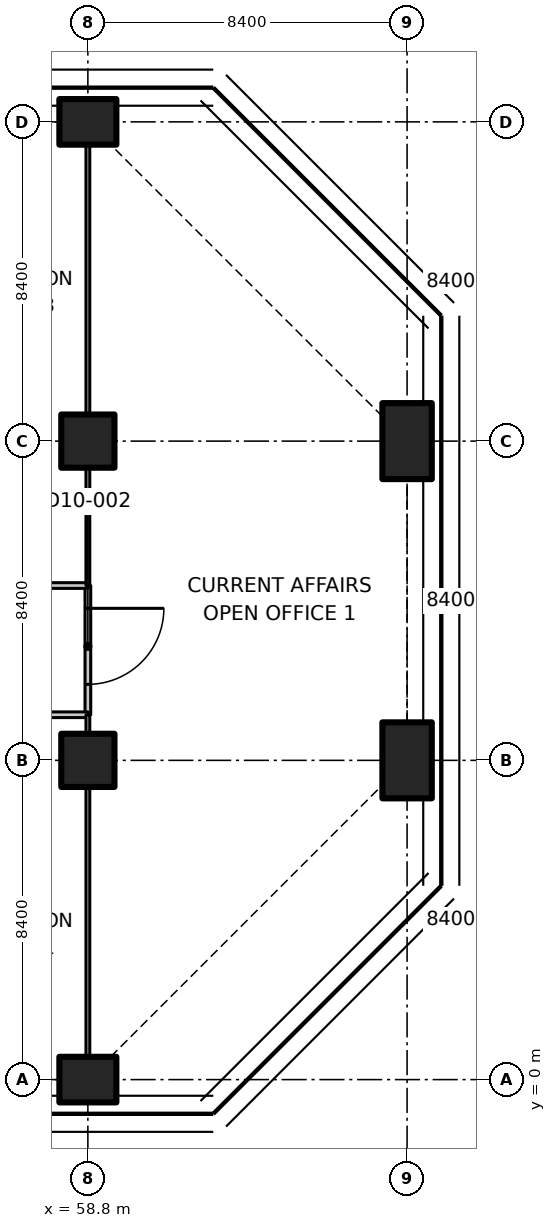
"""IFC4 building model, lengths in metres.
Left out: names, types, materials, properties, quantities, classifications, styles, units other than length and angle.
Written with IfcOpenShell. Run it as: python <this file> out.ifc"""

import sys

from ifc_helpers import new_model, si_unit, direction, frame, frame_2d, origin, origin_2d, place, context, subcontext, project, spatial, rectangle, extrude, element, fill, save


model = new_model("IFC4")
c1 = context("Model", 3, precision=1e-05, world=origin(), true_north=direction((0.0, 1.0)))
c2 = subcontext(c1, "Body", "Model", "MODEL_VIEW")
j1 = project(units=[si_unit("LENGTHUNIT", "METRE"), si_unit("PLANEANGLEUNIT", "RADIAN")], contexts=[c1])
p1 = place(None, origin())
s1 = spatial("IfcSite", under=j1, at=p1, CompositionType="ELEMENT")
p2 = place(p1, origin())
s2 = spatial("IfcBuilding", under=s1, at=p2, CompositionType="ELEMENT")
p3 = place(p2, frame((0.0, 0.0, 72.5)))
s3 = spatial("IfcBuildingStorey", under=s2, at=p3, CompositionType="ELEMENT", Elevation=72.5)
p4 = place(p3, frame((58.8, 0.0, 0.0), z_axis=(0.0, 0.0, 1.0), x_axis=(0.0, 1.0, 0.0)))
e1 = element("IfcColumn", 1, at=p4, inside=s3, PredefinedType="COLUMN", context=c2, shape_type="SweptSolid", body=[
    extrude(rectangle(XDim=1.2, YDim=1.5, at=origin_2d()), origin(), (0.0, 0.0, 1.0), 3.35),
])
for number, where, z_axis, x_axis in (
    (2, (58.8, 8.4, 0.0), (0.0, 0.0, 1.0), (1.0, 0.0, 0.0)),
    (3, (58.8, 16.8, 0.0), (0.0, 0.0, 1.0), (1.0, 0.0, 0.0)),
):
    element("IfcColumn", number, at=place(p3, frame(where, z_axis=z_axis, x_axis=x_axis)), inside=s3, PredefinedType="COLUMN", context=c2, shape_type="SweptSolid", body=[
        extrude(rectangle(XDim=1.4, YDim=1.4, at=origin_2d()), origin(), (0.0, 0.0, 1.0), 3.35),
    ])
p5 = place(p3, frame((58.8, 25.2, 0.0), z_axis=(0.0, 0.0, 1.0), x_axis=(0.0, 1.0, 0.0)))
e4 = element("IfcColumn", 4, at=p5, inside=s3, PredefinedType="COLUMN", context=c2, shape_type="SweptSolid", body=[
    extrude(rectangle(XDim=1.2, YDim=1.5, at=origin_2d()), origin(), (0.0, 0.0, 1.0), 3.35),
])
for number, where, z_axis, x_axis in (
    (5, (67.2, 8.4, 0.0), (0.0, 0.0, 1.0), (1.0, 0.0, 0.0)),
    (6, (67.2, 16.8, 0.0), (0.0, 0.0, 1.0), (1.0, 0.0, 0.0)),
):
    element("IfcColumn", number, at=place(p3, frame(where, z_axis=z_axis, x_axis=x_axis)), inside=s3, PredefinedType="COLUMN", context=c2, shape_type="SweptSolid", body=[
        extrude(rectangle(XDim=1.3, YDim=2.0, at=origin_2d()), origin(), (0.0, 0.0, 1.0), 3.35),
    ])
p6 = place(p3, frame((58.8, 13.0, 0.0), z_axis=(0.0, 0.0, 1.0), x_axis=(0.0, -1.0, 0.0)))
e7 = element("IfcWall", 7, at=p6, inside=s3, PredefinedType="PARTITIONING", context=c2, shape_type="SweptSolid", body=[
    extrude(rectangle(XDim=3.4, YDim=0.15, at=frame_2d((1.7, 0.0))), origin(), (0.0, 0.0, 1.0), 3.33),
])
p7 = place(p6, frame((0.6, 0.0, 0.0)))
e8 = element("IfcOpeningElement", 8, at=p7, cuts=e7, PredefinedType="OPENING", context=c2, shape_type="SweptSolid", body=[
    extrude(rectangle(XDim=2.0, YDim=2.4, at=frame_2d((1.0, 1.2))), frame((0.0, 0.085, 0.0), z_axis=(0.0, -1.0, 0.0), x_axis=(1.0, 0.0, 0.0)), (0.0, 0.0, 1.0), 0.17),
])
p8 = place(p3, frame((58.8, 9.6, 0.0), z_axis=(0.0, 0.0, 1.0), x_axis=(-1.0, 0.0, 0.0)))
e9 = element("IfcWall", 9, at=p8, inside=s3, PredefinedType="PARTITIONING", context=c2, shape_type="SweptSolid", body=[
    extrude(rectangle(XDim=4.2, YDim=0.15, at=frame_2d((2.1, 0.0))), origin(), (0.0, 0.0, 1.0), 3.33),
])
p9 = place(p8, frame((1.5, 0.0, 0.0)))
e10 = element("IfcOpeningElement", 10, at=p9, cuts=e9, PredefinedType="OPENING", context=c2, shape_type="SweptSolid", body=[
    extrude(rectangle(XDim=1.1, YDim=2.1, at=frame_2d((0.55, 1.05))), frame((0.0, 0.085, 0.0), z_axis=(0.0, -1.0, 0.0), x_axis=(1.0, 0.0, 0.0)), (0.0, 0.0, 1.0), 0.17),
])
p10 = place(p3, frame((54.6, 13.0, 0.0), z_axis=(0.0, 0.0, 1.0), x_axis=(1.0, 0.0, 0.0)))
e11 = element("IfcWall", 11, at=p10, inside=s3, PredefinedType="PARTITIONING", context=c2, shape_type="SweptSolid", body=[
    extrude(rectangle(XDim=4.2, YDim=0.15, at=frame_2d((2.1, 0.0))), origin(), (0.0, 0.0, 1.0), 3.33),
])
p11 = place(p10, frame((1.5, 0.0, 0.0)))
e12 = element("IfcOpeningElement", 12, at=p11, cuts=e11, PredefinedType="OPENING", context=c2, shape_type="SweptSolid", body=[
    extrude(rectangle(XDim=1.1, YDim=2.1, at=frame_2d((0.55, 1.05))), frame((0.0, 0.085, 0.0), z_axis=(0.0, -1.0, 0.0), x_axis=(1.0, 0.0, 0.0)), (0.0, 0.0, 1.0), 0.17),
])
p12 = place(p3, frame((58.8, 0.62, 0.0), z_axis=(0.0, 0.0, 1.0), x_axis=(0.0, 1.0, 0.0)))
e13 = element("IfcWall", 13, at=p12, inside=s3, PredefinedType="PARTITIONING", context=c2, shape_type="SweptSolid", body=[
    extrude(rectangle(XDim=7.06, YDim=0.1, at=frame_2d((3.53, 0.0))), origin(), (0.0, 0.0, 1.0), 3.33),
])
p13 = place(p3, frame((58.8, 9.12, 0.0), z_axis=(0.0, 0.0, 1.0), x_axis=(0.0, 1.0, 0.0)))
e14 = element("IfcWall", 14, at=p13, inside=s3, PredefinedType="PARTITIONING", context=c2, shape_type="SweptSolid", body=[
    extrude(rectangle(XDim=0.48, YDim=0.1, at=frame_2d((0.24, 0.0))), origin(), (0.0, 0.0, 1.0), 3.33),
])
p14 = place(p3, frame((58.8, 13.0, 0.0), z_axis=(0.0, 0.0, 1.0), x_axis=(0.0, 1.0, 0.0)))
e15 = element("IfcWall", 15, at=p14, inside=s3, PredefinedType="PARTITIONING", context=c2, shape_type="SweptSolid", body=[
    extrude(rectangle(XDim=3.08, YDim=0.1, at=frame_2d((1.54, 0.0))), origin(), (0.0, 0.0, 1.0), 3.33),
])
p15 = place(p3, frame((58.8, 17.52, 0.0), z_axis=(0.0, 0.0, 1.0), x_axis=(0.0, 1.0, 0.0)))
e16 = element("IfcWall", 16, at=p15, inside=s3, PredefinedType="PARTITIONING", context=c2, shape_type="SweptSolid", body=[
    extrude(rectangle(XDim=7.06, YDim=0.1, at=frame_2d((3.53, 0.0))), origin(), (0.0, 0.0, 1.0), 3.33),
])
p16 = place(p7, origin())
e17 = element("IfcDoor", 17, at=p16, inside=s3, OperationType="DOUBLE_DOOR_SINGLE_SWING", PredefinedType="DOOR", context=c2, shape_type="SweptSolid", body=[
    extrude(rectangle(XDim=2.0, YDim=2.4, at=frame_2d((1.0, 1.2))), frame((0.0, 0.025, 0.0), z_axis=(0.0, -1.0, 0.0), x_axis=(1.0, 0.0, 0.0)), (0.0, 0.0, 1.0), 0.05),
])
fill(e8, e17)
save(model, sys.argv[1])
